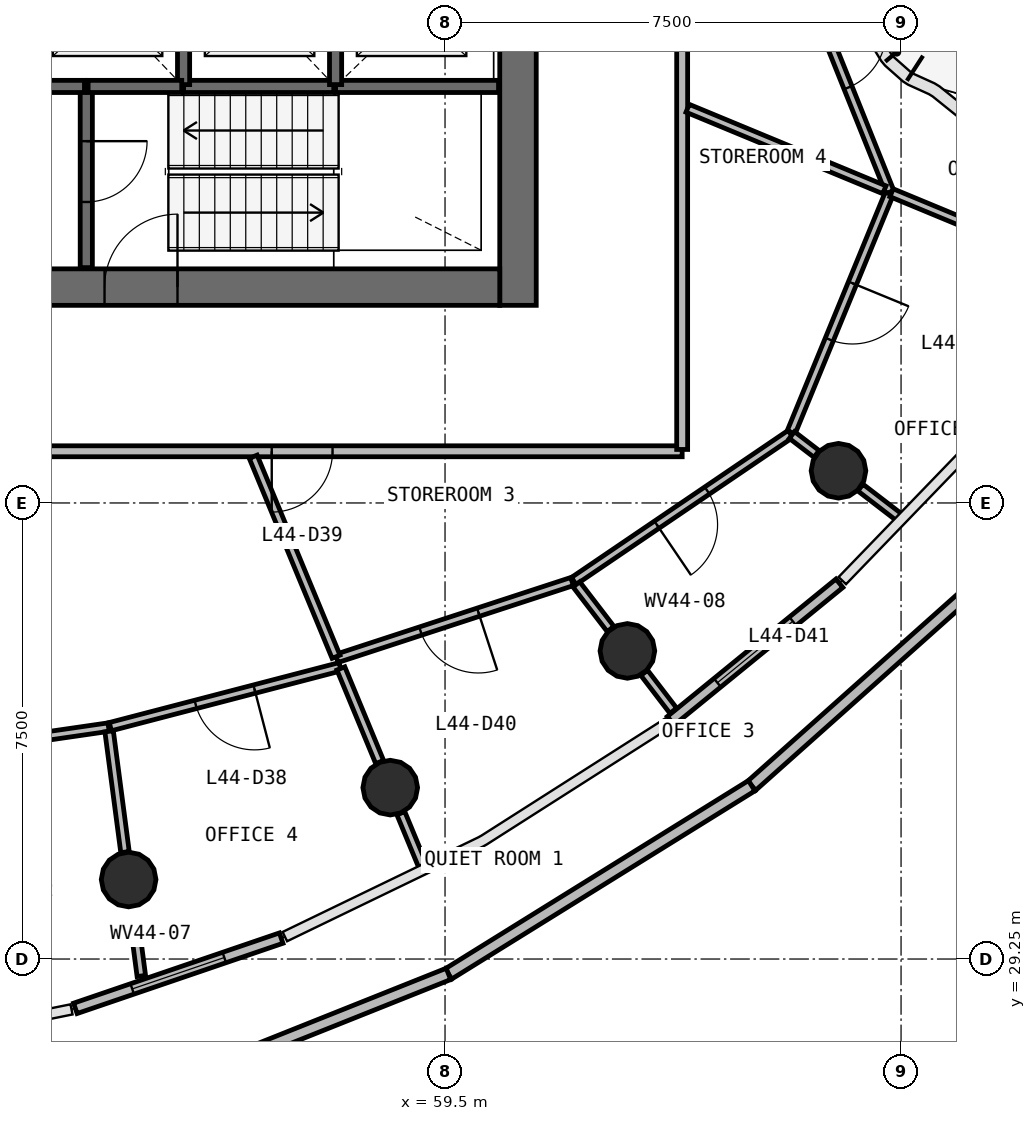
"""IFC4 building model, lengths in metres.
Left out: names, types, materials, properties, quantities, classifications, styles, units other than length and angle.
Written with IfcOpenShell. Run it as: python <this file> out.ifc"""

import sys

from ifc_helpers import new_model, si_unit, direction, frame, frame_2d, origin, origin_2d, place, context, subcontext, project, spatial, rectangle, circle, extrude, source, transform, mapped, element, fill, save


model = new_model("IFC4")
c1 = context("Model", 3, precision=1e-05, world=origin(), true_north=direction((0.0, 1.0)))
c2 = subcontext(c1, "Body", "Model", "MODEL_VIEW")
j1 = project(units=[si_unit("LENGTHUNIT", "METRE"), si_unit("PLANEANGLEUNIT", "RADIAN")], contexts=[c1])
p1 = place(None, origin())
s1 = spatial("IfcSite", under=j1, at=p1, CompositionType="ELEMENT")
p2 = place(p1, origin())
s2 = spatial("IfcBuilding", under=s1, at=p2, CompositionType="ELEMENT")
p3 = place(p2, frame((0.0, 0.0, 183.8)))
s3 = spatial("IfcBuildingStorey", under=s2, at=p3, CompositionType="ELEMENT", Elevation=183.8)
p4 = place(p3, frame((60.7, 40.0, 0.0), z_axis=(0.0, 0.0, 1.0), x_axis=(0.0, 1.0, 0.0)))
e1 = element("IfcWall", 1, at=p4, inside=s3, PredefinedType="SHEAR", context=c2, shape_type="SweptSolid", body=[
    extrude(rectangle(XDim=16.0, YDim=0.6, at=frame_2d((8.0, 0.0))), origin(), (0.0, 0.0, 1.0), 3.9),
])
p5 = place(p4, frame((7.1, 0.0, 0.0)))
e2 = element("IfcOpeningElement", 2, at=p5, cuts=e1, PredefinedType="OPENING", context=c2, shape_type="SweptSolid", body=[
    extrude(rectangle(XDim=1.8, YDim=2.1, at=frame_2d((0.9, 1.05))), frame((0.0, 0.31, 0.0), z_axis=(0.0, -1.0, 0.0), x_axis=(1.0, 0.0, 0.0)), (0.0, 0.0, 1.0), 0.62),
])
p6 = place(p3, frame((43.6, 40.3, 0.0), z_axis=(0.0, 0.0, 1.0), x_axis=(1.0, 0.0, 0.0)))
e3 = element("IfcWall", 3, at=p6, inside=s3, PredefinedType="SHEAR", context=c2, shape_type="SweptSolid", body=[
    extrude(rectangle(XDim=16.8, YDim=0.6, at=frame_2d((8.4, 0.0))), origin(), (0.0, 0.0, 1.0), 3.9),
])
p7 = place(p6, frame((10.3, 0.0, 0.0)))
e4 = element("IfcOpeningElement", 4, at=p7, cuts=e3, PredefinedType="OPENING", context=c2, shape_type="SweptSolid", body=[
    extrude(rectangle(XDim=1.2, YDim=2.1, at=frame_2d((0.6, 1.05))), frame((0.0, 0.31, 0.0), z_axis=(0.0, -1.0, 0.0), x_axis=(1.0, 0.0, 0.0)), (0.0, 0.0, 1.0), 0.62),
])
p8 = place(p6, frame((7.25, 0.0, 0.0)))
e5 = element("IfcOpeningElement", 5, at=p8, cuts=e3, PredefinedType="OPENING", context=c2, shape_type="SweptSolid", body=[
    extrude(rectangle(XDim=1.1, YDim=2.1, at=frame_2d((0.55, 1.05))), frame((0.0, 0.31, 0.0), z_axis=(0.0, -1.0, 0.0), x_axis=(1.0, 0.0, 0.0)), (0.0, 0.0, 1.0), 0.62),
])
p9 = place(p6, frame((0.7, 0.0, 0.0)))
e6 = element("IfcOpeningElement", 6, at=p9, cuts=e3, PredefinedType="OPENING", context=c2, shape_type="SweptSolid", body=[
    extrude(rectangle(XDim=0.8, YDim=2.1, at=frame_2d((0.4, 1.05))), frame((0.0, 0.31, 0.0), z_axis=(0.0, -1.0, 0.0), x_axis=(1.0, 0.0, 0.0)), (0.0, 0.0, 1.0), 0.62),
])
m1 = source(origin(), c2, "Body", "SweptSolid", [
    extrude(circle(Radius=0.45, at=origin_2d()), origin(), (0.0, 0.0, 1.0), 4.22),
])
for number, where, z_axis, x_axis in (
    (7, (54.296, 30.558, -0.32), (0.0, 0.0, 1.0), (1.0, 0.0, 0.0)),
    (8, (58.599, 32.069, -0.32), (0.0, 0.0, 1.0), (1.0, 0.0, 0.0)),
    (9, (62.499, 34.317, -0.32), (0.0, 0.0, 1.0), (1.0, 0.0, 0.0)),
    (10, (65.971, 37.28, -0.32), (0.0, 0.0, 1.0), (1.0, 0.0, 0.0)),
):
    element("IfcColumn", number, at=place(p3, frame(where, z_axis=z_axis, x_axis=x_axis)), inside=s3, PredefinedType="COLUMN", context=c2, shape_type="MappedRepresentation", body=[
        mapped(m1, transform((0.0, 0.0, 0.0), scale=1.0)),
    ])
p10 = place(p3, frame((53.42, 28.439, 0.0), z_axis=(0.0, 0.0, 1.0), x_axis=(0.946413978014, 0.322956006632, 0.0)))
e11 = element("IfcWall", 11, at=p10, inside=s3, PredefinedType="STANDARD", context=c2, shape_type="SweptSolid", body=[
    extrude(rectangle(XDim=3.577, YDim=0.18, at=frame_2d((1.789, 0.0))), origin(), (0.0, 0.0, 1.0), 3.58),
])
p11 = place(p10, frame((0.989, 0.0, 0.9)))
e12 = element("IfcOpeningElement", 12, at=p11, cuts=e11, PredefinedType="OPENING", context=c2, shape_type="SweptSolid", body=[
    extrude(rectangle(XDim=1.6, YDim=2.0, at=frame_2d((0.8, 1.0))), frame((0.0, 0.1, 0.0), z_axis=(0.0, -1.0, 0.0), x_axis=(1.0, 0.0, 0.0)), (0.0, 0.0, 1.0), 0.2),
])
p12 = place(p3, frame((63.213, 33.169, 0.0), z_axis=(0.0, 0.0, 1.0), x_axis=(0.775083979565, 0.631858231426, 0.0)))
e13 = element("IfcWall", 13, at=p12, inside=s3, PredefinedType="STANDARD", context=c2, shape_type="SweptSolid", body=[
    extrude(rectangle(XDim=3.578, YDim=0.18, at=frame_2d((1.789, 0.0))), origin(), (0.0, 0.0, 1.0), 3.58),
])
p13 = place(p12, frame((0.989, 0.0, 0.9)))
e14 = element("IfcOpeningElement", 14, at=p13, cuts=e13, PredefinedType="OPENING", context=c2, shape_type="SweptSolid", body=[
    extrude(rectangle(XDim=1.6, YDim=2.0, at=frame_2d((0.8, 1.0))), frame((0.0, 0.1, 0.0), z_axis=(0.0, -1.0, 0.0), x_axis=(1.0, 0.0, 0.0)), (0.0, 0.0, 1.0), 0.2),
])
p14 = place(p3, frame((68.925, 36.005, 0.0), z_axis=(0.0, 0.0, 1.0), x_axis=(-0.746520458461, -0.665362461444, 0.0)))
e15 = element("IfcWall", 15, at=p14, inside=s3, PredefinedType="PARAPET", context=c2, shape_type="SweptSolid", body=[
    extrude(rectangle(XDim=5.869, YDim=0.2, at=frame_2d((2.935, 0.0))), origin(), (0.0, 0.0, 1.0), 1.1),
])
p15 = place(p3, frame((64.543, 32.1, 0.0), z_axis=(0.0, 0.0, 1.0), x_axis=(-0.849674226438, -0.527307982991, 0.0)))
e16 = element("IfcWall", 16, at=p15, inside=s3, PredefinedType="PARAPET", context=c2, shape_type="SweptSolid", body=[
    extrude(rectangle(XDim=5.869, YDim=0.2, at=frame_2d((2.935, 0.0))), origin(), (0.0, 0.0, 1.0), 1.1),
])
p16 = place(p3, frame((59.556, 29.005, 0.0), z_axis=(0.0, 0.0, 1.0), x_axis=(-0.928728959039, -0.370759383755, 0.0)))
e17 = element("IfcWall", 17, at=p16, inside=s3, PredefinedType="PARAPET", context=c2, shape_type="SweptSolid", body=[
    extrude(rectangle(XDim=5.868, YDim=0.2, at=frame_2d((2.934, 0.0))), origin(), (0.0, 0.0, 1.0), 1.1),
])
p17 = place(p3, frame((53.6, 43.6, 0.0), z_axis=(0.0, 0.0, 1.0), x_axis=(0.0, -1.0, 0.0)))
e18 = element("IfcWall", 18, at=p17, inside=s3, PredefinedType="SOLIDWALL", context=c2, shape_type="SweptSolid", body=[
    extrude(rectangle(XDim=2.98, YDim=0.2, at=frame_2d((1.49, 0.0))), origin(), (0.0, 0.0, 1.0), 3.58),
])
p18 = place(p17, frame((0.9, 0.0, 0.0)))
e19 = element("IfcOpeningElement", 19, at=p18, cuts=e18, PredefinedType="OPENING", context=c2, shape_type="SweptSolid", body=[
    extrude(rectangle(XDim=1.0, YDim=2.1, at=frame_2d((0.5, 1.05))), frame((0.0, 0.11, 0.0), z_axis=(0.0, -1.0, 0.0), x_axis=(1.0, 0.0, 0.0)), (0.0, 0.0, 1.0), 0.22),
])
p19 = place(p3, frame((57.7, 43.6, 0.0), z_axis=(0.0, 0.0, 1.0), x_axis=(1.0, 0.0, 0.0)))
e20 = element("IfcWall", 20, at=p19, inside=s3, PredefinedType="SOLIDWALL", context=c2, shape_type="SweptSolid", body=[
    extrude(rectangle(XDim=2.68, YDim=0.2, at=frame_2d((1.34, 0.0))), origin(), (0.0, 0.0, 1.0), 3.58),
])
p20 = place(p3, frame((55.2, 43.6, 0.0), z_axis=(0.0, 0.0, 1.0), x_axis=(1.0, 0.0, 0.0)))
e21 = element("IfcWall", 21, at=p20, inside=s3, PredefinedType="SOLIDWALL", context=c2, shape_type="SweptSolid", body=[
    extrude(rectangle(XDim=2.47, YDim=0.2, at=frame_2d((1.235, 0.0))), origin(), (0.0, 0.0, 1.0), 3.58),
])
for number, where, z_axis, x_axis in (
    (22, (55.2, 43.63, 0.0), (0.0, 0.0, 1.0), (0.0, 1.0, 0.0)),
    (23, (57.7, 43.63, 0.0), (0.0, 0.0, 1.0), (0.0, 1.0, 0.0)),
):
    element("IfcWall", number, at=place(p3, frame(where, z_axis=z_axis, x_axis=x_axis)), inside=s3, PredefinedType="SOLIDWALL", context=c2, shape_type="SweptSolid", body=[
        extrude(rectangle(XDim=2.36, YDim=0.2, at=frame_2d((1.18, 0.0))), origin(), (0.0, 0.0, 1.0), 3.58),
    ])
p21 = place(p3, frame((53.63, 43.6, 0.0), z_axis=(0.0, 0.0, 1.0), x_axis=(1.0, 0.0, 0.0)))
e24 = element("IfcWall", 24, at=p21, inside=s3, PredefinedType="SOLIDWALL", context=c2, shape_type="SweptSolid", body=[
    extrude(rectangle(XDim=1.54, YDim=0.2, at=frame_2d((0.77, 0.0))), origin(), (0.0, 0.0, 1.0), 3.58),
])
p22 = place(p3, frame((52.73, 43.6, 0.0), z_axis=(0.0, 0.0, 1.0), x_axis=(1.0, 0.0, 0.0)))
e25 = element("IfcWall", 25, at=p22, inside=s3, PredefinedType="SOLIDWALL", context=c2, shape_type="SweptSolid", body=[
    extrude(rectangle(XDim=0.84, YDim=0.2, at=frame_2d((0.42, 0.0))), origin(), (0.0, 0.0, 1.0), 3.58),
])
p23 = place(p3, frame((63.4, 37.6, 0.0), z_axis=(0.0, 0.0, 1.0), x_axis=(-1.0, 0.0, 0.0)))
e26 = element("IfcWall", 26, at=p23, inside=s3, PredefinedType="PARTITIONING", context=c2, shape_type="SweptSolid", body=[
    extrude(rectangle(XDim=22.8, YDim=0.18, at=frame_2d((11.4, 0.0))), origin(), (0.0, 0.0, 1.0), 2.88),
])
p24 = place(p23, frame((10.95, 0.0, 0.0)))
e27 = element("IfcOpeningElement", 27, at=p24, cuts=e26, PredefinedType="OPENING", context=c2, shape_type="SweptSolid", body=[
    extrude(rectangle(XDim=1.0, YDim=2.1, at=frame_2d((0.5, 1.05))), frame((0.0, 0.1, 0.0), z_axis=(0.0, -1.0, 0.0), x_axis=(1.0, 0.0, 0.0)), (0.0, 0.0, 1.0), 0.2),
])
p25 = place(p23, frame((5.75, 0.0, 0.0)))
e28 = element("IfcOpeningElement", 28, at=p25, cuts=e26, PredefinedType="OPENING", context=c2, shape_type="SweptSolid", body=[
    extrude(rectangle(XDim=1.0, YDim=2.1, at=frame_2d((0.5, 1.05))), frame((0.0, 0.1, 0.0), z_axis=(0.0, -1.0, 0.0), x_axis=(1.0, 0.0, 0.0)), (0.0, 0.0, 1.0), 0.2),
])
p26 = place(p3, frame((63.4, 58.37, 0.0), z_axis=(0.0, 0.0, 1.0), x_axis=(0.0, -1.0, 0.0)))
e29 = element("IfcWall", 29, at=p26, inside=s3, PredefinedType="PARTITIONING", context=c2, shape_type="SweptSolid", body=[
    extrude(rectangle(XDim=20.74, YDim=0.18, at=frame_2d((10.37, 0.0))), origin(), (0.0, 0.0, 1.0), 2.88),
])
p27 = place(p26, frame((7.69, 0.0, 0.0)))
e30 = element("IfcOpeningElement", 30, at=p27, cuts=e29, PredefinedType="OPENING", context=c2, shape_type="SweptSolid", body=[
    extrude(rectangle(XDim=1.0, YDim=2.1, at=frame_2d((0.5, 1.05))), frame((0.0, 0.1, 0.0), z_axis=(0.0, -1.0, 0.0), x_axis=(1.0, 0.0, 0.0)), (0.0, 0.0, 1.0), 0.2),
])
p28 = place(p26, frame((9.89, 0.0, 0.0)))
e31 = element("IfcOpeningElement", 31, at=p28, cuts=e29, PredefinedType="OPENING", context=c2, shape_type="SweptSolid", body=[
    extrude(rectangle(XDim=1.0, YDim=2.1, at=frame_2d((0.5, 1.05))), frame((0.0, 0.1, 0.0), z_axis=(0.0, -1.0, 0.0), x_axis=(1.0, 0.0, 0.0)), (0.0, 0.0, 1.0), 0.2),
])
p29 = place(p3, frame((65.044, 46.283, 0.0), z_axis=(0.0, 0.0, 1.0), x_axis=(0.372115410521, -0.92818646901, 0.0)))
e32 = element("IfcWall", 32, at=p29, inside=s3, PredefinedType="PARTITIONING", context=c2, shape_type="SweptSolid", body=[
    extrude(rectangle(XDim=4.762, YDim=0.14, at=frame_2d((2.381, 0.0))), origin(), (0.0, 0.0, 1.0), 2.88),
])
p30 = place(p29, frame((1.912, 0.0, 0.0)))
e33 = element("IfcOpeningElement", 33, at=p30, cuts=e32, PredefinedType="OPENING", context=c2, shape_type="SweptSolid", body=[
    extrude(rectangle(XDim=1.0, YDim=2.1, at=frame_2d((0.5, 1.05))), frame((0.0, 0.08, 0.0), z_axis=(0.0, -1.0, 0.0), x_axis=(1.0, 0.0, 0.0)), (0.0, 0.0, 1.0), 0.16),
])
p31 = place(p3, frame((65.182, 37.885, 0.0), z_axis=(0.0, 0.0, 1.0), x_axis=(-0.827453202768, -0.561534680344, 0.0)))
e34 = element("IfcWall", 34, at=p31, inside=s3, PredefinedType="PARTITIONING", context=c2, shape_type="SweptSolid", body=[
    extrude(rectangle(XDim=4.308, YDim=0.14, at=frame_2d((2.154, 0.0))), origin(), (0.0, 0.0, 1.0), 2.88),
])
p32 = place(p31, frame((1.658, 0.0, 0.0)))
e35 = element("IfcOpeningElement", 35, at=p32, cuts=e34, PredefinedType="OPENING", context=c2, shape_type="SweptSolid", body=[
    extrude(rectangle(XDim=1.0, YDim=2.1, at=frame_2d((0.5, 1.05))), frame((0.0, 0.08, 0.0), z_axis=(0.0, -1.0, 0.0), x_axis=(1.0, 0.0, 0.0)), (0.0, 0.0, 1.0), 0.16),
])
p33 = place(p3, frame((66.805, 41.835, 0.0), z_axis=(0.0, 0.0, 1.0), x_axis=(-0.380060488543, -0.924961634366, 0.0)))
e36 = element("IfcWall", 36, at=p33, inside=s3, PredefinedType="PARTITIONING", context=c2, shape_type="SweptSolid", body=[
    extrude(rectangle(XDim=4.24, YDim=0.14, at=frame_2d((2.12, 0.0))), origin(), (0.0, 0.0, 1.0), 2.88),
])
p34 = place(p33, frame((1.59, 0.0, 0.0)))
e37 = element("IfcOpeningElement", 37, at=p34, cuts=e36, PredefinedType="OPENING", context=c2, shape_type="SweptSolid", body=[
    extrude(rectangle(XDim=1.0, YDim=2.1, at=frame_2d((0.5, 1.05))), frame((0.0, 0.08, 0.0), z_axis=(0.0, -1.0, 0.0), x_axis=(1.0, 0.0, 0.0)), (0.0, 0.0, 1.0), 0.16),
])
p35 = place(p3, frame((61.589, 35.457, 0.0), z_axis=(0.0, 0.0, 1.0), x_axis=(-0.950567170275, -0.310519008749, 0.0)))
e38 = element("IfcWall", 38, at=p35, inside=s3, PredefinedType="PARTITIONING", context=c2, shape_type="SweptSolid", body=[
    extrude(rectangle(XDim=4.071, YDim=0.14, at=frame_2d((2.036, 0.0))), origin(), (0.0, 0.0, 1.0), 2.88),
])
p36 = place(p35, frame((1.621, 0.0, 0.0)))
e39 = element("IfcOpeningElement", 39, at=p36, cuts=e38, PredefinedType="OPENING", context=c2, shape_type="SweptSolid", body=[
    extrude(rectangle(XDim=1.0, YDim=2.1, at=frame_2d((0.5, 1.05))), frame((0.0, 0.08, 0.0), z_axis=(0.0, -1.0, 0.0), x_axis=(1.0, 0.0, 0.0)), (0.0, 0.0, 1.0), 0.16),
])
p37 = place(p3, frame((53.966, 33.064, 0.0), z_axis=(0.0, 0.0, 1.0), x_axis=(-0.989628850434, -0.143647966879, 0.0)))
e40 = element("IfcWall", 40, at=p37, inside=s3, PredefinedType="PARTITIONING", context=c2, shape_type="SweptSolid", body=[
    extrude(rectangle(XDim=4.021, YDim=0.14, at=frame_2d((2.011, 0.0))), origin(), (0.0, 0.0, 1.0), 2.88),
])
p38 = place(p37, frame((1.571, 0.0, 0.0)))
e41 = element("IfcOpeningElement", 41, at=p38, cuts=e40, PredefinedType="OPENING", context=c2, shape_type="SweptSolid", body=[
    extrude(rectangle(XDim=1.0, YDim=2.1, at=frame_2d((0.5, 1.05))), frame((0.0, 0.08, 0.0), z_axis=(0.0, -1.0, 0.0), x_axis=(1.0, 0.0, 0.0)), (0.0, 0.0, 1.0), 0.16),
])
p39 = place(p3, frame((57.775, 34.057, 0.0), z_axis=(0.0, 0.0, 1.0), x_axis=(-0.96764845844, -0.252302320398, 0.0)))
e42 = element("IfcWall", 42, at=p39, inside=s3, PredefinedType="PARTITIONING", context=c2, shape_type="SweptSolid", body=[
    extrude(rectangle(XDim=3.906, YDim=0.14, at=frame_2d((1.953, 0.0))), origin(), (0.0, 0.0, 1.0), 2.88),
])
p40 = place(p39, frame((1.456, 0.0, 0.0)))
e43 = element("IfcOpeningElement", 43, at=p40, cuts=e42, PredefinedType="OPENING", context=c2, shape_type="SweptSolid", body=[
    extrude(rectangle(XDim=1.0, YDim=2.1, at=frame_2d((0.5, 1.05))), frame((0.0, 0.08, 0.0), z_axis=(0.0, -1.0, 0.0), x_axis=(1.0, 0.0, 0.0)), (0.0, 0.0, 1.0), 0.16),
])
p41 = place(p3, frame((56.345, 37.51, 0.0), z_axis=(0.0, 0.0, 1.0), x_axis=(0.382666743194, -0.923886445216, 0.0)))
e44 = element("IfcWall", 44, at=p41, inside=s3, PredefinedType="PARTITIONING", context=c2, shape_type="SweptSolid", body=[
    extrude(rectangle(XDim=3.56, YDim=0.14, at=frame_2d((1.78, 0.0))), origin(), (0.0, 0.0, 1.0), 2.88),
])
p42 = place(p3, frame((63.49, 43.241, 0.0), z_axis=(0.0, 0.0, 1.0), x_axis=(0.92386899199, -0.382708878444, 0.0)))
e45 = element("IfcWall", 45, at=p42, inside=s3, PredefinedType="PARTITIONING", context=c2, shape_type="SweptSolid", body=[
    extrude(rectangle(XDim=3.502, YDim=0.14, at=frame_2d((1.751, 0.0))), origin(), (0.0, 0.0, 1.0), 2.88),
])
p43 = place(p3, frame((53.976, 32.994, 0.0), z_axis=(0.0, 0.0, 1.0), x_axis=(0.13051125281, -0.99144682807, 0.0)))
e46 = element("IfcWall", 46, at=p43, inside=s3, PredefinedType="PARTITIONING", context=c2, shape_type="SweptSolid", body=[
    extrude(rectangle(XDim=2.003, YDim=0.14, at=frame_2d((1.002, 0.0))), origin(), (0.0, 0.0, 1.0), 2.88),
])
p44 = place(p3, frame((66.844, 41.852, 0.0), z_axis=(0.0, 0.0, 1.0), x_axis=(0.923848346372, -0.38275871369, 0.0)))
e47 = element("IfcWall", 47, at=p44, inside=s3, PredefinedType="PARTITIONING", context=c2, shape_type="SweptSolid", body=[
    extrude(rectangle(XDim=1.943, YDim=0.14, at=frame_2d((0.971, 0.0))), origin(), (0.0, 0.0, 1.0), 2.88),
])
p45 = place(p3, frame((57.787, 34.029, 0.0), z_axis=(0.0, 0.0, 1.0), x_axis=(0.382649262881, -0.923893685235, 0.0)))
e48 = element("IfcWall", 48, at=p45, inside=s3, PredefinedType="PARTITIONING", context=c2, shape_type="SweptSolid", body=[
    extrude(rectangle(XDim=1.667, YDim=0.14, at=frame_2d((0.833, 0.0))), origin(), (0.0, 0.0, 1.0), 2.88),
])
p46 = place(p3, frame((54.408, 29.71, 0.0), z_axis=(0.0, 0.0, 1.0), x_axis=(0.13027669696, -0.991477676112, 0.0)))
e49 = element("IfcWall", 49, at=p46, inside=s3, PredefinedType="PARTITIONING", context=c2, shape_type="SweptSolid", body=[
    extrude(rectangle(XDim=0.746, YDim=0.14, at=frame_2d((0.373, 0.0))), origin(), (0.0, 0.0, 1.0), 2.88),
])
p47 = place(p3, frame((61.66, 35.411, 0.0), z_axis=(0.0, 0.0, 1.0), x_axis=(0.608753072392, -0.793359752479, 0.0)))
e50 = element("IfcWall", 50, at=p47, inside=s3, PredefinedType="PARTITIONING", context=c2, shape_type="SweptSolid", body=[
    extrude(rectangle(XDim=0.924, YDim=0.14, at=frame_2d((0.462, 0.0))), origin(), (0.0, 0.0, 1.0), 2.88),
])
p48 = place(p3, frame((58.773, 31.648, 0.0), z_axis=(0.0, 0.0, 1.0), x_axis=(0.382644588695, -0.92389562113, 0.0)))
e51 = element("IfcWall", 51, at=p48, inside=s3, PredefinedType="PARTITIONING", context=c2, shape_type="SweptSolid", body=[
    extrude(rectangle(XDim=0.933, YDim=0.14, at=frame_2d((0.466, 0.0))), origin(), (0.0, 0.0, 1.0), 2.88),
])
p49 = place(p3, frame((66.332, 37.003, 0.0), z_axis=(0.0, 0.0, 1.0), x_axis=(0.793364436395, -0.608746968011, 0.0)))
e52 = element("IfcWall", 52, at=p49, inside=s3, PredefinedType="PARTITIONING", context=c2, shape_type="SweptSolid", body=[
    extrude(rectangle(XDim=0.796, YDim=0.14, at=frame_2d((0.398, 0.0))), origin(), (0.0, 0.0, 1.0), 2.88),
])
p50 = place(p3, frame((62.776, 33.956, 0.0), z_axis=(0.0, 0.0, 1.0), x_axis=(0.608959740389, -0.793201131231, 0.0)))
e53 = element("IfcWall", 53, at=p50, inside=s3, PredefinedType="PARTITIONING", context=c2, shape_type="SweptSolid", body=[
    extrude(rectangle(XDim=0.786, YDim=0.14, at=frame_2d((0.393, 0.0))), origin(), (0.0, 0.0, 1.0), 2.88),
])
p51 = place(p3, frame((65.205, 37.867, 0.0), z_axis=(0.0, 0.0, 1.0), x_axis=(0.793352294755, -0.608762791575, 0.0)))
e54 = element("IfcWall", 54, at=p51, inside=s3, PredefinedType="PARTITIONING", context=c2, shape_type="SweptSolid", body=[
    extrude(rectangle(XDim=0.51, YDim=0.14, at=frame_2d((0.255, 0.0))), origin(), (0.0, 0.0, 1.0), 2.88),
])
m2 = source(origin(), c2, "Body", "SweptSolid", [
    extrude(rectangle(XDim=1.6, YDim=2.0, at=frame_2d((0.8, 1.0))), frame((0.0, 0.03, 0.0), z_axis=(0.0, -1.0, 0.0), x_axis=(1.0, 0.0, 0.0)), (0.0, 0.0, 1.0), 0.06),
])
p52 = place(p11, origin())
e55 = element("IfcWindow", 55, at=p52, inside=s3, PartitioningType="SINGLE_PANEL", PredefinedType="WINDOW", context=c2, shape_type="MappedRepresentation", body=[
    mapped(m2, transform((0.0, 0.0, 0.0), scale=1.0)),
])
fill(e12, e55)
p53 = place(p13, origin())
e56 = element("IfcWindow", 56, at=p53, inside=s3, PartitioningType="SINGLE_PANEL", PredefinedType="WINDOW", context=c2, shape_type="MappedRepresentation", body=[
    mapped(m2, transform((0.0, 0.0, 0.0), scale=1.0)),
])
fill(e14, e56)
m3 = source(origin(), c2, "Body", "SweptSolid", [
    extrude(rectangle(XDim=1.2, YDim=2.1, at=frame_2d((0.6, 1.05))), frame((0.0, 0.025, 0.0), z_axis=(0.0, -1.0, 0.0), x_axis=(1.0, 0.0, 0.0)), (0.0, 0.0, 1.0), 0.05),
])
p54 = place(p7, origin())
e57 = element("IfcDoor", 57, at=p54, inside=s3, OperationType="SINGLE_SWING_RIGHT", PredefinedType="DOOR", context=c2, shape_type="MappedRepresentation", body=[
    mapped(m3, transform((0.0, 0.0, 0.0), scale=1.0)),
])
fill(e4, e57)
m4 = source(origin(), c2, "Body", "SweptSolid", [
    extrude(rectangle(XDim=1.0, YDim=2.1, at=frame_2d((0.5, 1.05))), frame((0.0, 0.025, 0.0), z_axis=(0.0, -1.0, 0.0), x_axis=(1.0, 0.0, 0.0)), (0.0, 0.0, 1.0), 0.05),
])
p55 = place(p18, origin())
e58 = element("IfcDoor", 58, at=p55, inside=s3, OperationType="SINGLE_SWING_LEFT", PredefinedType="DOOR", context=c2, shape_type="MappedRepresentation", body=[
    mapped(m4, transform((0.0, 0.0, 0.0), scale=1.0)),
])
fill(e19, e58)
m5 = source(origin(), c2, "Body", "SweptSolid", [
    extrude(rectangle(XDim=1.0, YDim=2.1, at=frame_2d((0.5, 1.05))), frame((0.0, 0.025, 0.0), z_axis=(0.0, -1.0, 0.0), x_axis=(1.0, 0.0, 0.0)), (0.0, 0.0, 1.0), 0.05),
])
p56 = place(p40, origin())
e59 = element("IfcDoor", 59, at=p56, inside=s3, OperationType="SINGLE_SWING_LEFT", PredefinedType="DOOR", context=c2, shape_type="MappedRepresentation", body=[
    mapped(m5, transform((0.0, 0.0, 0.0), scale=1.0)),
])
fill(e43, e59)
p57 = place(p25, origin())
e60 = element("IfcDoor", 60, at=p57, inside=s3, OperationType="SINGLE_SWING_RIGHT", PredefinedType="DOOR", context=c2, shape_type="MappedRepresentation", body=[
    mapped(m5, transform((0.0, 0.0, 0.0), scale=1.0)),
])
fill(e28, e60)
p58 = place(p36, origin())
e61 = element("IfcDoor", 61, at=p58, inside=s3, OperationType="SINGLE_SWING_LEFT", PredefinedType="DOOR", context=c2, shape_type="MappedRepresentation", body=[
    mapped(m5, transform((0.0, 0.0, 0.0), scale=1.0)),
])
fill(e39, e61)
p59 = place(p32, origin())
e62 = element("IfcDoor", 62, at=p59, inside=s3, OperationType="SINGLE_SWING_RIGHT", PredefinedType="DOOR", context=c2, shape_type="MappedRepresentation", body=[
    mapped(m5, transform((0.0, 0.0, 0.0), scale=1.0)),
])
fill(e35, e62)
p60 = place(p34, origin())
e63 = element("IfcDoor", 63, at=p60, inside=s3, OperationType="SINGLE_SWING_LEFT", PredefinedType="DOOR", context=c2, shape_type="MappedRepresentation", body=[
    mapped(m5, transform((0.0, 0.0, 0.0), scale=1.0)),
])
fill(e37, e63)
p61 = place(p30, origin())
e64 = element("IfcDoor", 64, at=p61, inside=s3, OperationType="SINGLE_SWING_LEFT", PredefinedType="DOOR", context=c2, shape_type="MappedRepresentation", body=[
    mapped(m5, transform((0.0, 0.0, 0.0), scale=1.0)),
])
fill(e33, e64)
save(model, sys.argv[1])
